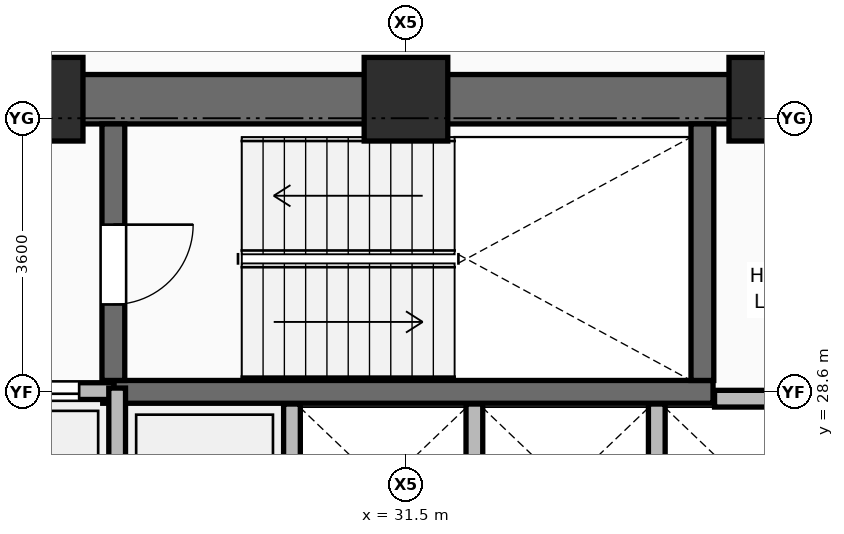
"""IFC4 building model, lengths in metres.
Left out: names, types, materials, properties, quantities, classifications, styles, units other than length and angle.
Written with IfcOpenShell. Run it as: python <this file> out.ifc"""

import sys

from ifc_helpers import new_model, si_unit, direction, frame, frame_2d, origin, origin_2d, place, context, subcontext, project, spatial, rectangle, extrude, element, fill, save


model = new_model("IFC4")
c1 = context("Model", 3, precision=1e-05, world=origin(), true_north=direction((0.0, 1.0)))
c2 = subcontext(c1, "Body", "Model", "MODEL_VIEW")
j1 = project(units=[si_unit("LENGTHUNIT", "METRE"), si_unit("PLANEANGLEUNIT", "RADIAN")], contexts=[c1])
p1 = place(None, origin())
s1 = spatial("IfcSite", under=j1, at=p1, CompositionType="ELEMENT")
p2 = place(p1, origin())
s2 = spatial("IfcBuilding", under=s1, at=p2, CompositionType="ELEMENT")
p3 = place(p2, frame((0.0, 0.0, 53.25)))
s3 = spatial("IfcBuildingStorey", under=s2, at=p3, CompositionType="ELEMENT", Elevation=53.25)
for number, where, z_axis, x_axis in (
    (1, (26.7, 32.45, 0.0), (0.0, 0.0, 1.0), (1.0, 0.0, 0.0)),
    (2, (31.5, 32.45, 0.0), (0.0, 0.0, 1.0), (1.0, 0.0, 0.0)),
    (3, (36.3, 32.45, 0.0), (0.0, 0.0, 1.0), (1.0, 0.0, 0.0)),
):
    element("IfcColumn", number, at=place(p3, frame(where, z_axis=z_axis, x_axis=x_axis)), inside=s3, PredefinedType="COLUMN", context=c2, shape_type="SweptSolid", body=[
        extrude(rectangle(XDim=1.1, YDim=1.1, at=origin_2d()), origin(), (0.0, 0.0, 1.0), 3.75),
    ])
p4 = place(p3, frame((30.0, 25.71, 0.0), z_axis=(0.0, 0.0, 1.0), x_axis=(0.0, 1.0, 0.0)))
e4 = element("IfcWall", 4, at=p4, inside=s3, PredefinedType="PARTITIONING", context=c2, shape_type="SweptSolid", body=[
    extrude(rectangle(XDim=2.73, YDim=0.22, at=frame_2d((1.365, 0.0))), origin(), (0.0, 0.0, 1.0), 3.545),
])
p5 = place(p3, frame((32.4, 26.2, 0.0), z_axis=(0.0, 0.0, 1.0), x_axis=(0.0, 1.0, 0.0)))
e5 = element("IfcWall", 5, at=p5, inside=s3, PredefinedType="PARTITIONING", context=c2, shape_type="SweptSolid", body=[
    extrude(rectangle(XDim=2.24, YDim=0.22, at=frame_2d((1.12, 0.0))), origin(), (0.0, 0.0, 1.0), 3.545),
])
p6 = place(p3, frame((34.8, 26.23, 0.0), z_axis=(0.0, 0.0, 1.0), x_axis=(0.0, 1.0, 0.0)))
e6 = element("IfcWall", 6, at=p6, inside=s3, PredefinedType="PARTITIONING", context=c2, shape_type="SweptSolid", body=[
    extrude(rectangle(XDim=2.21, YDim=0.22, at=frame_2d((1.105, 0.0))), origin(), (0.0, 0.0, 1.0), 3.545),
])
p7 = place(p3, frame((21.575, 32.45, 0.0), z_axis=(0.0, 0.0, 1.0), x_axis=(1.0, 0.0, 0.0)))
e7 = element("IfcWall", 7, at=p7, inside=s3, PredefinedType="SHEAR", context=c2, shape_type="SweptSolid", body=[
    extrude(rectangle(XDim=19.85, YDim=0.65, at=frame_2d((9.925, 0.0))), origin(), (0.0, 0.0, 1.0), 3.57),
])
p8 = place(p7, frame((2.175, 0.0, 0.0)))
e8 = element("IfcOpeningElement", 8, at=p8, cuts=e7, PredefinedType="OPENING", context=c2, shape_type="SweptSolid", body=[
    extrude(rectangle(XDim=1.1, YDim=2.1, at=frame_2d((0.55, 1.05))), frame((0.0, 0.335, 0.0), z_axis=(0.0, -1.0, 0.0), x_axis=(1.0, 0.0, 0.0)), (0.0, 0.0, 1.0), 0.67),
])
p9 = place(p7, frame((15.565, 0.0, 0.0)))
e9 = element("IfcOpeningElement", 9, at=p9, cuts=e7, PredefinedType="OPENING", context=c2, shape_type="SweptSolid", body=[
    extrude(rectangle(XDim=1.0, YDim=2.1, at=frame_2d((0.5, 1.05))), frame((0.0, 0.335, 0.0), z_axis=(0.0, -1.0, 0.0), x_axis=(1.0, 0.0, 0.0)), (0.0, 0.0, 1.0), 0.67),
])
p10 = place(p7, frame((17.575, 0.0, 0.0)))
e10 = element("IfcOpeningElement", 10, at=p10, cuts=e7, PredefinedType="OPENING", context=c2, shape_type="SweptSolid", body=[
    extrude(rectangle(XDim=0.9, YDim=2.1, at=frame_2d((0.45, 1.05))), frame((0.0, 0.335, 0.0), z_axis=(0.0, -1.0, 0.0), x_axis=(1.0, 0.0, 0.0)), (0.0, 0.0, 1.0), 0.67),
])
p11 = place(p3, frame((27.51, 28.6, 0.0), z_axis=(0.0, 0.0, 1.0), x_axis=(1.0, 0.0, 0.0)))
e11 = element("IfcWall", 11, at=p11, inside=s3, PredefinedType="SHEAR", context=c2, shape_type="SweptSolid", body=[
    extrude(rectangle(XDim=8.03, YDim=0.3, at=frame_2d((4.015, 0.0))), origin(), (0.0, 0.0, 1.0), 3.57),
])
p12 = place(p3, frame((27.65, 28.75, 0.0), z_axis=(0.0, 0.0, 1.0), x_axis=(0.0, 1.0, 0.0)))
e12 = element("IfcWall", 12, at=p12, inside=s3, PredefinedType="SHEAR", context=c2, shape_type="SweptSolid", body=[
    extrude(rectangle(XDim=3.375, YDim=0.3, at=frame_2d((1.688, 0.0))), origin(), (0.0, 0.0, 1.0), 3.57),
])
p13 = place(p12, frame((1.0, 0.0, 0.0)))
e13 = element("IfcOpeningElement", 13, at=p13, cuts=e12, PredefinedType="OPENING", context=c2, shape_type="SweptSolid", body=[
    extrude(rectangle(XDim=1.05, YDim=2.1, at=frame_2d((0.525, 1.05))), frame((0.0, 0.16, 0.0), z_axis=(0.0, -1.0, 0.0), x_axis=(1.0, 0.0, 0.0)), (0.0, 0.0, 1.0), 0.32),
])
p14 = place(p3, frame((35.4, 28.75, 0.0), z_axis=(0.0, 0.0, 1.0), x_axis=(0.0, 1.0, 0.0)))
e14 = element("IfcWall", 14, at=p14, inside=s3, PredefinedType="SHEAR", context=c2, shape_type="SweptSolid", body=[
    extrude(rectangle(XDim=3.375, YDim=0.3, at=frame_2d((1.688, 0.0))), origin(), (0.0, 0.0, 1.0), 3.57),
])
p15 = place(p3, frame((25.64, 28.61, 0.0), z_axis=(0.0, 0.0, 1.0), x_axis=(1.0, 0.0, 0.0)))
e15 = element("IfcWall", 15, at=p15, inside=s3, PredefinedType="PARTITIONING", context=c2, shape_type="SweptSolid", body=[
    extrude(rectangle(XDim=2.02, YDim=0.22, at=frame_2d((1.01, 0.0))), origin(), (0.0, 0.0, 1.0), 3.55),
])
p16 = place(p15, frame((0.46, 0.0, 0.0)))
e16 = element("IfcOpeningElement", 16, at=p16, cuts=e15, PredefinedType="OPENING", context=c2, shape_type="SweptSolid", body=[
    extrude(rectangle(XDim=1.1, YDim=2.2, at=frame_2d((0.55, 1.1))), frame((0.0, 0.12, 0.0), z_axis=(0.0, -1.0, 0.0), x_axis=(1.0, 0.0, 0.0)), (0.0, 0.0, 1.0), 0.24),
])
p17 = place(p3, frame((35.56, 28.51, 0.0), z_axis=(0.0, 0.0, 1.0), x_axis=(1.0, 0.0, 0.0)))
e17 = element("IfcWall", 17, at=p17, inside=s3, PredefinedType="PARTITIONING", context=c2, shape_type="SweptSolid", body=[
    extrude(rectangle(XDim=1.6, YDim=0.22, at=frame_2d((0.8, 0.0))), origin(), (0.0, 0.0, 1.0), 3.55),
])
p18 = place(p3, frame((27.7, 25.65, 0.0), z_axis=(0.0, 0.0, 1.0), x_axis=(0.0, 1.0, 0.0)))
e18 = element("IfcWall", 18, at=p18, inside=s3, PredefinedType="PARTITIONING", context=c2, shape_type="SweptSolid", body=[
    extrude(rectangle(XDim=3.0, YDim=0.22, at=frame_2d((1.5, 0.0))), origin(), (0.0, 0.0, 1.0), 3.55),
])
p19 = place(p13, frame((1.05, 0.0, 0.0), z_axis=(0.0, 0.0, 1.0), x_axis=(-1.0, 0.0, 0.0)))
e19 = element("IfcDoor", 19, at=p19, inside=s3, OperationType="SINGLE_SWING_LEFT", PredefinedType="DOOR", context=c2, shape_type="SweptSolid", body=[
    extrude(rectangle(XDim=1.05, YDim=2.1, at=frame_2d((0.525, 1.05))), frame((0.0, 0.025, 0.0), z_axis=(0.0, -1.0, 0.0), x_axis=(1.0, 0.0, 0.0)), (0.0, 0.0, 1.0), 0.05),
])
fill(e13, e19)
p20 = place(p16, origin())
e20 = element("IfcDoor", 20, at=p20, inside=s3, OperationType="DOUBLE_DOOR_SLIDING", PredefinedType="DOOR", context=c2, shape_type="SweptSolid", body=[
    extrude(rectangle(XDim=1.1, YDim=2.2, at=frame_2d((0.55, 1.1))), frame((0.0, 0.025, 0.0), z_axis=(0.0, -1.0, 0.0), x_axis=(1.0, 0.0, 0.0)), (0.0, 0.0, 1.0), 0.05),
])
fill(e16, e20)
save(model, sys.argv[1])
